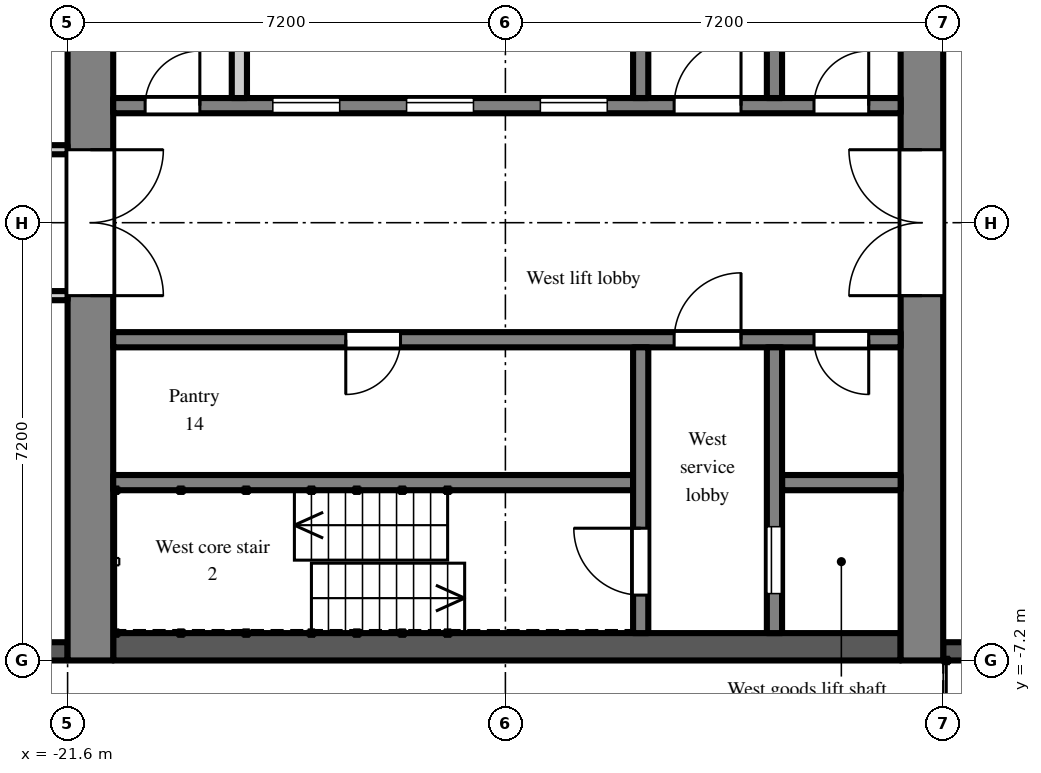
"""IFC4 building model, lengths in metres.
Left out: names, types, materials, properties, quantities, classifications, styles, units other than length and angle.
Written with IfcOpenShell. Run it as: python <this file> out.ifc"""

import sys

from ifc_helpers import new_model, si_unit, direction, frame, frame_2d, origin, place, context, subcontext, project, spatial, rectangle, extrude, element, fill, save


model = new_model("IFC4")
c1 = context("Model", 3, precision=1e-05, world=origin(), true_north=direction((0.0, 1.0)))
c2 = subcontext(c1, "Body", "Model", "MODEL_VIEW")
j1 = project(units=[si_unit("LENGTHUNIT", "METRE"), si_unit("PLANEANGLEUNIT", "RADIAN")], contexts=[c1])
p1 = place(None, origin())
s1 = spatial("IfcSite", under=j1, at=p1, CompositionType="ELEMENT")
p2 = place(p1, origin())
s2 = spatial("IfcBuilding", under=s1, at=p2, CompositionType="ELEMENT")
p3 = place(p2, frame((0.0, 0.0, 129.3)))
s3 = spatial("IfcBuildingStorey", under=s2, at=p3, CompositionType="ELEMENT", Elevation=129.3)
p4 = place(p3, frame((-24.3, -7.05, 0.0), z_axis=(0.0, 0.0, 1.0), x_axis=(1.0, 0.0, 0.0)))
e1 = element("IfcWall", 1, at=p4, inside=s3, PredefinedType="SOLIDWALL", context=c2, shape_type="SweptSolid", body=[
    extrude(rectangle(XDim=2.7, YDim=0.3, at=frame_2d((1.35, 0.0))), origin(), (0.0, 0.0, 1.0), 2.2),
])
p5 = place(p4, frame((0.75, 0.0, 0.2)))
e2 = element("IfcOpeningElement", 2, at=p5, cuts=e1, PredefinedType="OPENING", context=c2, shape_type="SweptSolid", body=[
    extrude(rectangle(XDim=1.2, YDim=1.85, at=frame_2d((0.6, 0.925))), frame((0.0, 0.16, 0.0), z_axis=(0.0, -1.0, 0.0), x_axis=(1.0, 0.0, 0.0)), (0.0, 0.0, 1.0), 0.32),
])
p6 = place(p3, frame((-7.2, -7.05, 0.0), z_axis=(0.0, 0.0, 1.0), x_axis=(1.0, 0.0, 0.0)))
e3 = element("IfcWall", 3, at=p6, inside=s3, PredefinedType="SOLIDWALL", context=c2, shape_type="SweptSolid", body=[
    extrude(rectangle(XDim=3.0, YDim=0.3, at=frame_2d((1.5, 0.0))), origin(), (0.0, 0.0, 1.0), 2.2),
])
p7 = place(p3, frame((-7.55, -7.2, 0.0), z_axis=(0.0, 0.0, 1.0), x_axis=(0.0, 1.0, 0.0)))
e4 = element("IfcWall", 4, at=p7, inside=s3, PredefinedType="SHEAR", context=c2, shape_type="SweptSolid", body=[
    extrude(rectangle(XDim=14.4, YDim=0.7, at=frame_2d((7.2, 0.0))), origin(), (0.0, 0.0, 1.0), 2.6),
])
p8 = place(p7, frame((6.0, 0.0, 0.0)))
e5 = element("IfcOpeningElement", 5, at=p8, cuts=e4, PredefinedType="OPENING", context=c2, shape_type="SweptSolid", body=[
    extrude(rectangle(XDim=2.4, YDim=2.2, at=frame_2d((1.2, 1.1))), frame((0.0, 0.36, 0.0), z_axis=(0.0, -1.0, 0.0), x_axis=(1.0, 0.0, 0.0)), (0.0, 0.0, 1.0), 0.72),
])
p9 = place(p3, frame((-21.225, -7.2, 0.0), z_axis=(0.0, 0.0, 1.0), x_axis=(0.0, 1.0, 0.0)))
e6 = element("IfcWall", 6, at=p9, inside=s3, PredefinedType="SHEAR", context=c2, shape_type="SweptSolid", body=[
    extrude(rectangle(XDim=14.4, YDim=0.75, at=frame_2d((7.2, 0.0))), origin(), (0.0, 0.0, 1.0), 2.6),
])
p10 = place(p9, frame((6.0, 0.0, 0.0)))
e7 = element("IfcOpeningElement", 7, at=p10, cuts=e6, PredefinedType="OPENING", context=c2, shape_type="SweptSolid", body=[
    extrude(rectangle(XDim=2.4, YDim=2.2, at=frame_2d((1.2, 1.1))), frame((0.0, 0.385, 0.0), z_axis=(0.0, -1.0, 0.0), x_axis=(1.0, 0.0, 0.0)), (0.0, 0.0, 1.0), 0.77),
])
p11 = place(p3, frame((-7.9, 1.925, 0.0), z_axis=(0.0, 0.0, 1.0), x_axis=(-1.0, 0.0, 0.0)))
e8 = element("IfcWall", 8, at=p11, inside=s3, PredefinedType="SHEAR", context=c2, shape_type="SweptSolid", body=[
    extrude(rectangle(XDim=12.95, YDim=0.25, at=frame_2d((6.475, 0.0))), origin(), (0.0, 0.0, 1.0), 2.6),
])
p12 = place(p11, frame((4.825, 0.0, 0.0)))
e9 = element("IfcOpeningElement", 9, at=p12, cuts=e8, PredefinedType="OPENING", context=c2, shape_type="SweptSolid", body=[
    extrude(rectangle(XDim=1.1, YDim=2.1, at=frame_2d((0.55, 1.05))), frame((0.0, 0.135, 0.0), z_axis=(0.0, -1.0, 0.0), x_axis=(1.0, 0.0, 0.0)), (0.0, 0.0, 1.0), 0.27),
])
p13 = place(p11, frame((7.025, 0.0, 0.0)))
e10 = element("IfcOpeningElement", 10, at=p13, cuts=e8, PredefinedType="OPENING", context=c2, shape_type="SweptSolid", body=[
    extrude(rectangle(XDim=1.1, YDim=2.1, at=frame_2d((0.55, 1.05))), frame((0.0, 0.135, 0.0), z_axis=(0.0, -1.0, 0.0), x_axis=(1.0, 0.0, 0.0)), (0.0, 0.0, 1.0), 0.27),
])
p14 = place(p11, frame((9.225, 0.0, 0.0)))
e11 = element("IfcOpeningElement", 11, at=p14, cuts=e8, PredefinedType="OPENING", context=c2, shape_type="SweptSolid", body=[
    extrude(rectangle(XDim=1.1, YDim=2.1, at=frame_2d((0.55, 1.05))), frame((0.0, 0.135, 0.0), z_axis=(0.0, -1.0, 0.0), x_axis=(1.0, 0.0, 0.0)), (0.0, 0.0, 1.0), 0.27),
])
p15 = place(p11, frame((0.525, 0.0, 0.0)))
e12 = element("IfcOpeningElement", 12, at=p15, cuts=e8, PredefinedType="OPENING", context=c2, shape_type="SweptSolid", body=[
    extrude(rectangle(XDim=0.9, YDim=2.1, at=frame_2d((0.45, 1.05))), frame((0.0, 0.135, 0.0), z_axis=(0.0, -1.0, 0.0), x_axis=(1.0, 0.0, 0.0)), (0.0, 0.0, 1.0), 0.27),
])
p16 = place(p11, frame((2.625, 0.0, 0.0)))
e13 = element("IfcOpeningElement", 13, at=p16, cuts=e8, PredefinedType="OPENING", context=c2, shape_type="SweptSolid", body=[
    extrude(rectangle(XDim=1.1, YDim=2.1, at=frame_2d((0.55, 1.05))), frame((0.0, 0.135, 0.0), z_axis=(0.0, -1.0, 0.0), x_axis=(1.0, 0.0, 0.0)), (0.0, 0.0, 1.0), 0.27),
])
p17 = place(p11, frame((11.525, 0.0, 0.0)))
e14 = element("IfcOpeningElement", 14, at=p17, cuts=e8, PredefinedType="OPENING", context=c2, shape_type="SweptSolid", body=[
    extrude(rectangle(XDim=0.9, YDim=2.1, at=frame_2d((0.45, 1.05))), frame((0.0, 0.135, 0.0), z_axis=(0.0, -1.0, 0.0), x_axis=(1.0, 0.0, 0.0)), (0.0, 0.0, 1.0), 0.27),
])
p18 = place(p3, frame((-9.975, 2.05, 0.0), z_axis=(0.0, 0.0, 1.0), x_axis=(0.0, 1.0, 0.0)))
e15 = element("IfcWall", 15, at=p18, inside=s3, PredefinedType="SHEAR", context=c2, shape_type="SweptSolid", body=[
    extrude(rectangle(XDim=4.7, YDim=0.25, at=frame_2d((2.35, 0.0))), origin(), (0.0, 0.0, 1.0), 2.6),
])
p19 = place(p18, frame((2.95, 0.0, 0.0)))
e16 = element("IfcOpeningElement", 16, at=p19, cuts=e15, PredefinedType="OPENING", context=c2, shape_type="SweptSolid", body=[
    extrude(rectangle(XDim=1.1, YDim=2.1, at=frame_2d((0.55, 1.05))), frame((0.0, 0.135, 0.0), z_axis=(0.0, -1.0, 0.0), x_axis=(1.0, 0.0, 0.0)), (0.0, 0.0, 1.0), 0.27),
])
p20 = place(p3, frame((-12.175, 2.05, 0.0), z_axis=(0.0, 0.0, 1.0), x_axis=(0.0, 1.0, 0.0)))
e17 = element("IfcWall", 17, at=p20, inside=s3, PredefinedType="SHEAR", context=c2, shape_type="SweptSolid", body=[
    extrude(rectangle(XDim=4.7, YDim=0.25, at=frame_2d((2.35, 0.0))), origin(), (0.0, 0.0, 1.0), 2.6),
])
p21 = place(p20, frame((2.975, 0.0, 0.0)))
e18 = element("IfcOpeningElement", 18, at=p21, cuts=e17, PredefinedType="OPENING", context=c2, shape_type="SweptSolid", body=[
    extrude(rectangle(XDim=1.1, YDim=2.1, at=frame_2d((0.55, 1.05))), frame((0.0, 0.135, 0.0), z_axis=(0.0, -1.0, 0.0), x_axis=(1.0, 0.0, 0.0)), (0.0, 0.0, 1.0), 0.27),
])
p22 = place(p3, frame((-18.775, 2.05, 0.0), z_axis=(0.0, 0.0, 1.0), x_axis=(0.0, 1.0, 0.0)))
e19 = element("IfcWall", 19, at=p22, inside=s3, PredefinedType="PARTITIONING", context=c2, shape_type="SweptSolid", body=[
    extrude(rectangle(XDim=2.1, YDim=0.25, at=frame_2d((1.05, 0.0))), origin(), (0.0, 0.0, 1.0), 2.6),
])
p23 = place(p3, frame((-7.9, -6.975, 0.0), z_axis=(0.0, 0.0, 1.0), x_axis=(-1.0, 0.0, 0.0)))
e20 = element("IfcWall", 20, at=p23, inside=s3, PredefinedType="SHEAR", context=c2, shape_type="SweptSolid", body=[
    extrude(rectangle(XDim=12.95, YDim=0.45, at=frame_2d((6.475, 0.0))), origin(), (0.0, 0.0, 1.0), 2.6),
])
p24 = place(p3, frame((-7.9, -1.925, 0.0), z_axis=(0.0, 0.0, 1.0), x_axis=(-1.0, 0.0, 0.0)))
e21 = element("IfcWall", 21, at=p24, inside=s3, PredefinedType="SHEAR", context=c2, shape_type="SweptSolid", body=[
    extrude(rectangle(XDim=12.95, YDim=0.25, at=frame_2d((6.475, 0.0))), origin(), (0.0, 0.0, 1.0), 2.6),
])
p25 = place(p24, frame((0.525, 0.0, 0.0)))
e22 = element("IfcOpeningElement", 22, at=p25, cuts=e21, PredefinedType="OPENING", context=c2, shape_type="SweptSolid", body=[
    extrude(rectangle(XDim=0.9, YDim=2.1, at=frame_2d((0.45, 1.05))), frame((0.0, 0.135, 0.0), z_axis=(0.0, -1.0, 0.0), x_axis=(1.0, 0.0, 0.0)), (0.0, 0.0, 1.0), 0.27),
])
p26 = place(p24, frame((2.625, 0.0, 0.0)))
e23 = element("IfcOpeningElement", 23, at=p26, cuts=e21, PredefinedType="OPENING", context=c2, shape_type="SweptSolid", body=[
    extrude(rectangle(XDim=1.1, YDim=2.1, at=frame_2d((0.55, 1.05))), frame((0.0, 0.135, 0.0), z_axis=(0.0, -1.0, 0.0), x_axis=(1.0, 0.0, 0.0)), (0.0, 0.0, 1.0), 0.27),
])
p27 = place(p24, frame((8.225, 0.0, 0.0)))
e24 = element("IfcOpeningElement", 24, at=p27, cuts=e21, PredefinedType="OPENING", context=c2, shape_type="SweptSolid", body=[
    extrude(rectangle(XDim=0.9, YDim=2.1, at=frame_2d((0.45, 1.05))), frame((0.0, 0.135, 0.0), z_axis=(0.0, -1.0, 0.0), x_axis=(1.0, 0.0, 0.0)), (0.0, 0.0, 1.0), 0.27),
])
p28 = place(p3, frame((-7.9, -4.275, 0.0), z_axis=(0.0, 0.0, 1.0), x_axis=(-1.0, 0.0, 0.0)))
e25 = element("IfcWall", 25, at=p28, inside=s3, PredefinedType="SHEAR", context=c2, shape_type="SweptSolid", body=[
    extrude(rectangle(XDim=1.95, YDim=0.25, at=frame_2d((0.975, 0.0))), origin(), (0.0, 0.0, 1.0), 2.6),
])
p29 = place(p3, frame((-12.3, -4.275, 0.0), z_axis=(0.0, 0.0, 1.0), x_axis=(-1.0, 0.0, 0.0)))
e26 = element("IfcWall", 26, at=p29, inside=s3, PredefinedType="SHEAR", context=c2, shape_type="SweptSolid", body=[
    extrude(rectangle(XDim=8.55, YDim=0.25, at=frame_2d((4.275, 0.0))), origin(), (0.0, 0.0, 1.0), 2.6),
])
p30 = place(p3, frame((-9.975, -2.05, 0.0), z_axis=(0.0, 0.0, 1.0), x_axis=(0.0, -1.0, 0.0)))
e27 = element("IfcWall", 27, at=p30, inside=s3, PredefinedType="SHEAR", context=c2, shape_type="SweptSolid", body=[
    extrude(rectangle(XDim=4.7, YDim=0.25, at=frame_2d((2.35, 0.0))), origin(), (0.0, 0.0, 1.0), 2.6),
])
p31 = place(p30, frame((2.95, 0.0, 0.0)))
e28 = element("IfcOpeningElement", 28, at=p31, cuts=e27, PredefinedType="OPENING", context=c2, shape_type="SweptSolid", body=[
    extrude(rectangle(XDim=1.1, YDim=2.1, at=frame_2d((0.55, 1.05))), frame((0.0, 0.135, 0.0), z_axis=(0.0, -1.0, 0.0), x_axis=(1.0, 0.0, 0.0)), (0.0, 0.0, 1.0), 0.27),
])
p32 = place(p3, frame((-12.175, -2.05, 0.0), z_axis=(0.0, 0.0, 1.0), x_axis=(0.0, -1.0, 0.0)))
e29 = element("IfcWall", 29, at=p32, inside=s3, PredefinedType="SHEAR", context=c2, shape_type="SweptSolid", body=[
    extrude(rectangle(XDim=4.7, YDim=0.25, at=frame_2d((2.35, 0.0))), origin(), (0.0, 0.0, 1.0), 2.6),
])
p33 = place(p32, frame((2.975, 0.0, 0.0)))
e30 = element("IfcOpeningElement", 30, at=p33, cuts=e29, PredefinedType="OPENING", context=c2, shape_type="SweptSolid", body=[
    extrude(rectangle(XDim=1.1, YDim=2.1, at=frame_2d((0.55, 1.05))), frame((0.0, 0.135, 0.0), z_axis=(0.0, -1.0, 0.0), x_axis=(1.0, 0.0, 0.0)), (0.0, 0.0, 1.0), 0.27),
])
p34 = place(p3, frame((-36.5, -1.2, 0.0), z_axis=(0.0, 0.0, 1.0), x_axis=(1.0, 0.0, 0.0)))
e31 = element("IfcWall", 31, at=p34, inside=s3, PredefinedType="PARTITIONING", context=c2, shape_type="SweptSolid", body=[
    extrude(rectangle(XDim=14.9, YDim=0.15, at=frame_2d((7.45, 0.0))), origin(), (0.0, 0.0, 1.0), 2.6),
])
p35 = place(p34, frame((7.9, 0.0, 0.0)))
e32 = element("IfcOpeningElement", 32, at=p35, cuts=e31, PredefinedType="OPENING", context=c2, shape_type="SweptSolid", body=[
    extrude(rectangle(XDim=1.0, YDim=2.1, at=frame_2d((0.5, 1.05))), frame((0.0, 0.085, 0.0), z_axis=(0.0, -1.0, 0.0), x_axis=(1.0, 0.0, 0.0)), (0.0, 0.0, 1.0), 0.17),
])
p36 = place(p34, frame((4.3, 0.0, 0.0)))
e33 = element("IfcOpeningElement", 33, at=p36, cuts=e31, PredefinedType="OPENING", context=c2, shape_type="SweptSolid", body=[
    extrude(rectangle(XDim=1.0, YDim=2.1, at=frame_2d((0.5, 1.05))), frame((0.0, 0.085, 0.0), z_axis=(0.0, -1.0, 0.0), x_axis=(1.0, 0.0, 0.0)), (0.0, 0.0, 1.0), 0.17),
])
p37 = place(p34, frame((1.15, 0.0, 0.0)))
e34 = element("IfcOpeningElement", 34, at=p37, cuts=e31, PredefinedType="OPENING", context=c2, shape_type="SweptSolid", body=[
    extrude(rectangle(XDim=1.8, YDim=2.1, at=frame_2d((0.9, 1.05))), frame((0.0, 0.085, 0.0), z_axis=(0.0, -1.0, 0.0), x_axis=(1.0, 0.0, 0.0)), (0.0, 0.0, 1.0), 0.17),
])
p38 = place(p3, frame((-36.5, 1.2, 0.0), z_axis=(0.0, 0.0, 1.0), x_axis=(1.0, 0.0, 0.0)))
e35 = element("IfcWall", 35, at=p38, inside=s3, PredefinedType="PARTITIONING", context=c2, shape_type="SweptSolid", body=[
    extrude(rectangle(XDim=14.9, YDim=0.15, at=frame_2d((7.45, 0.0))), origin(), (0.0, 0.0, 1.0), 2.6),
])
p39 = place(p38, frame((12.65, 0.0, 0.0)))
e36 = element("IfcOpeningElement", 36, at=p39, cuts=e35, PredefinedType="OPENING", context=c2, shape_type="SweptSolid", body=[
    extrude(rectangle(XDim=0.9, YDim=2.1, at=frame_2d((0.45, 1.05))), frame((0.0, 0.085, 0.0), z_axis=(0.0, -1.0, 0.0), x_axis=(1.0, 0.0, 0.0)), (0.0, 0.0, 1.0), 0.17),
])
p40 = place(p38, frame((9.05, 0.0, 0.0)))
e37 = element("IfcOpeningElement", 37, at=p40, cuts=e35, PredefinedType="OPENING", context=c2, shape_type="SweptSolid", body=[
    extrude(rectangle(XDim=0.9, YDim=2.1, at=frame_2d((0.45, 1.05))), frame((0.0, 0.085, 0.0), z_axis=(0.0, -1.0, 0.0), x_axis=(1.0, 0.0, 0.0)), (0.0, 0.0, 1.0), 0.17),
])
p41 = place(p38, frame((6.5, 0.0, 0.0)))
e38 = element("IfcOpeningElement", 38, at=p41, cuts=e35, PredefinedType="OPENING", context=c2, shape_type="SweptSolid", body=[
    extrude(rectangle(XDim=1.0, YDim=2.1, at=frame_2d((0.5, 1.05))), frame((0.0, 0.085, 0.0), z_axis=(0.0, -1.0, 0.0), x_axis=(1.0, 0.0, 0.0)), (0.0, 0.0, 1.0), 0.17),
])
p42 = place(p38, frame((1.15, 0.0, 0.0)))
e39 = element("IfcOpeningElement", 39, at=p42, cuts=e35, PredefinedType="OPENING", context=c2, shape_type="SweptSolid", body=[
    extrude(rectangle(XDim=1.8, YDim=2.1, at=frame_2d((0.9, 1.05))), frame((0.0, 0.085, 0.0), z_axis=(0.0, -1.0, 0.0), x_axis=(1.0, 0.0, 0.0)), (0.0, 0.0, 1.0), 0.17),
])
p43 = place(p12, origin())
e40 = element("IfcDoor", 40, at=p43, inside=s3, OperationType="SLIDING_TO_LEFT", PredefinedType="DOOR", context=c2, shape_type="SweptSolid", body=[
    extrude(rectangle(XDim=1.1, YDim=2.1, at=frame_2d((0.55, 1.05))), frame((0.0, 0.025, 0.0), z_axis=(0.0, -1.0, 0.0), x_axis=(1.0, 0.0, 0.0)), (0.0, 0.0, 1.0), 0.05),
])
fill(e9, e40)
p44 = place(p13, origin())
e41 = element("IfcDoor", 41, at=p44, inside=s3, OperationType="SLIDING_TO_LEFT", PredefinedType="DOOR", context=c2, shape_type="SweptSolid", body=[
    extrude(rectangle(XDim=1.1, YDim=2.1, at=frame_2d((0.55, 1.05))), frame((0.0, 0.025, 0.0), z_axis=(0.0, -1.0, 0.0), x_axis=(1.0, 0.0, 0.0)), (0.0, 0.0, 1.0), 0.05),
])
fill(e10, e41)
p45 = place(p14, origin())
e42 = element("IfcDoor", 42, at=p45, inside=s3, OperationType="SLIDING_TO_LEFT", PredefinedType="DOOR", context=c2, shape_type="SweptSolid", body=[
    extrude(rectangle(XDim=1.1, YDim=2.1, at=frame_2d((0.55, 1.05))), frame((0.0, 0.025, 0.0), z_axis=(0.0, -1.0, 0.0), x_axis=(1.0, 0.0, 0.0)), (0.0, 0.0, 1.0), 0.05),
])
fill(e11, e42)
p46 = place(p31, origin())
e43 = element("IfcDoor", 43, at=p46, inside=s3, OperationType="SLIDING_TO_LEFT", PredefinedType="DOOR", context=c2, shape_type="SweptSolid", body=[
    extrude(rectangle(XDim=1.1, YDim=2.1, at=frame_2d((0.55, 1.05))), frame((0.0, 0.025, 0.0), z_axis=(0.0, -1.0, 0.0), x_axis=(1.0, 0.0, 0.0)), (0.0, 0.0, 1.0), 0.05),
])
fill(e28, e43)
p47 = place(p33, frame((1.1, 0.0, 0.0), z_axis=(0.0, 0.0, 1.0), x_axis=(-1.0, 0.0, 0.0)))
e44 = element("IfcDoor", 44, at=p47, inside=s3, OperationType="SINGLE_SWING_RIGHT", PredefinedType="DOOR", context=c2, shape_type="SweptSolid", body=[
    extrude(rectangle(XDim=1.1, YDim=2.1, at=frame_2d((0.55, 1.05))), frame((0.0, 0.025, 0.0), z_axis=(0.0, -1.0, 0.0), x_axis=(1.0, 0.0, 0.0)), (0.0, 0.0, 1.0), 0.05),
])
fill(e30, e44)
p48 = place(p15, frame((0.9, 0.0, 0.0), z_axis=(0.0, 0.0, 1.0), x_axis=(-1.0, 0.0, 0.0)))
e45 = element("IfcDoor", 45, at=p48, inside=s3, OperationType="SINGLE_SWING_RIGHT", PredefinedType="DOOR", context=c2, shape_type="SweptSolid", body=[
    extrude(rectangle(XDim=0.9, YDim=2.1, at=frame_2d((0.45, 1.05))), frame((0.0, 0.025, 0.0), z_axis=(0.0, -1.0, 0.0), x_axis=(1.0, 0.0, 0.0)), (0.0, 0.0, 1.0), 0.05),
])
fill(e12, e45)
p49 = place(p25, origin())
e46 = element("IfcDoor", 46, at=p49, inside=s3, OperationType="SINGLE_SWING_LEFT", PredefinedType="DOOR", context=c2, shape_type="SweptSolid", body=[
    extrude(rectangle(XDim=0.9, YDim=2.1, at=frame_2d((0.45, 1.05))), frame((0.0, 0.025, 0.0), z_axis=(0.0, -1.0, 0.0), x_axis=(1.0, 0.0, 0.0)), (0.0, 0.0, 1.0), 0.05),
])
fill(e22, e46)
p50 = place(p16, frame((1.1, 0.0, 0.0), z_axis=(0.0, 0.0, 1.0), x_axis=(-1.0, 0.0, 0.0)))
e47 = element("IfcDoor", 47, at=p50, inside=s3, OperationType="SINGLE_SWING_RIGHT", PredefinedType="DOOR", context=c2, shape_type="SweptSolid", body=[
    extrude(rectangle(XDim=1.1, YDim=2.1, at=frame_2d((0.55, 1.05))), frame((0.0, 0.025, 0.0), z_axis=(0.0, -1.0, 0.0), x_axis=(1.0, 0.0, 0.0)), (0.0, 0.0, 1.0), 0.05),
])
fill(e13, e47)
p51 = place(p26, frame((1.1, 0.0, 0.0), z_axis=(0.0, 0.0, 1.0), x_axis=(-1.0, 0.0, 0.0)))
e48 = element("IfcDoor", 48, at=p51, inside=s3, OperationType="SINGLE_SWING_RIGHT", PredefinedType="DOOR", context=c2, shape_type="SweptSolid", body=[
    extrude(rectangle(XDim=1.1, YDim=2.1, at=frame_2d((0.55, 1.05))), frame((0.0, 0.025, 0.0), z_axis=(0.0, -1.0, 0.0), x_axis=(1.0, 0.0, 0.0)), (0.0, 0.0, 1.0), 0.05),
])
fill(e23, e48)
p52 = place(p8, origin())
e49 = element("IfcDoor", 49, at=p52, inside=s3, OperationType="DOUBLE_DOOR_DOUBLE_SWING", PredefinedType="DOOR", context=c2, shape_type="SweptSolid", body=[
    extrude(rectangle(XDim=2.4, YDim=2.2, at=frame_2d((1.2, 1.1))), frame((0.0, 0.025, 0.0), z_axis=(0.0, -1.0, 0.0), x_axis=(1.0, 0.0, 0.0)), (0.0, 0.0, 1.0), 0.05),
])
fill(e5, e49)
p53 = place(p10, frame((2.4, 0.0, 0.0), z_axis=(0.0, 0.0, 1.0), x_axis=(-1.0, 0.0, 0.0)))
e50 = element("IfcDoor", 50, at=p53, inside=s3, OperationType="DOUBLE_DOOR_DOUBLE_SWING", PredefinedType="DOOR", context=c2, shape_type="SweptSolid", body=[
    extrude(rectangle(XDim=2.4, YDim=2.2, at=frame_2d((1.2, 1.1))), frame((0.0, 0.025, 0.0), z_axis=(0.0, -1.0, 0.0), x_axis=(1.0, 0.0, 0.0)), (0.0, 0.0, 1.0), 0.05),
])
fill(e7, e50)
p54 = place(p17, frame((0.9, 0.0, 0.0), z_axis=(0.0, 0.0, 1.0), x_axis=(-1.0, 0.0, 0.0)))
e51 = element("IfcDoor", 51, at=p54, inside=s3, OperationType="SINGLE_SWING_RIGHT", PredefinedType="DOOR", context=c2, shape_type="SweptSolid", body=[
    extrude(rectangle(XDim=0.9, YDim=2.1, at=frame_2d((0.45, 1.05))), frame((0.0, 0.025, 0.0), z_axis=(0.0, -1.0, 0.0), x_axis=(1.0, 0.0, 0.0)), (0.0, 0.0, 1.0), 0.05),
])
fill(e14, e51)
p55 = place(p27, origin())
e52 = element("IfcDoor", 52, at=p55, inside=s3, OperationType="SINGLE_SWING_RIGHT", PredefinedType="DOOR", context=c2, shape_type="SweptSolid", body=[
    extrude(rectangle(XDim=0.9, YDim=2.1, at=frame_2d((0.45, 1.05))), frame((0.0, 0.025, 0.0), z_axis=(0.0, -1.0, 0.0), x_axis=(1.0, 0.0, 0.0)), (0.0, 0.0, 1.0), 0.05),
])
fill(e24, e52)
save(model, sys.argv[1])
